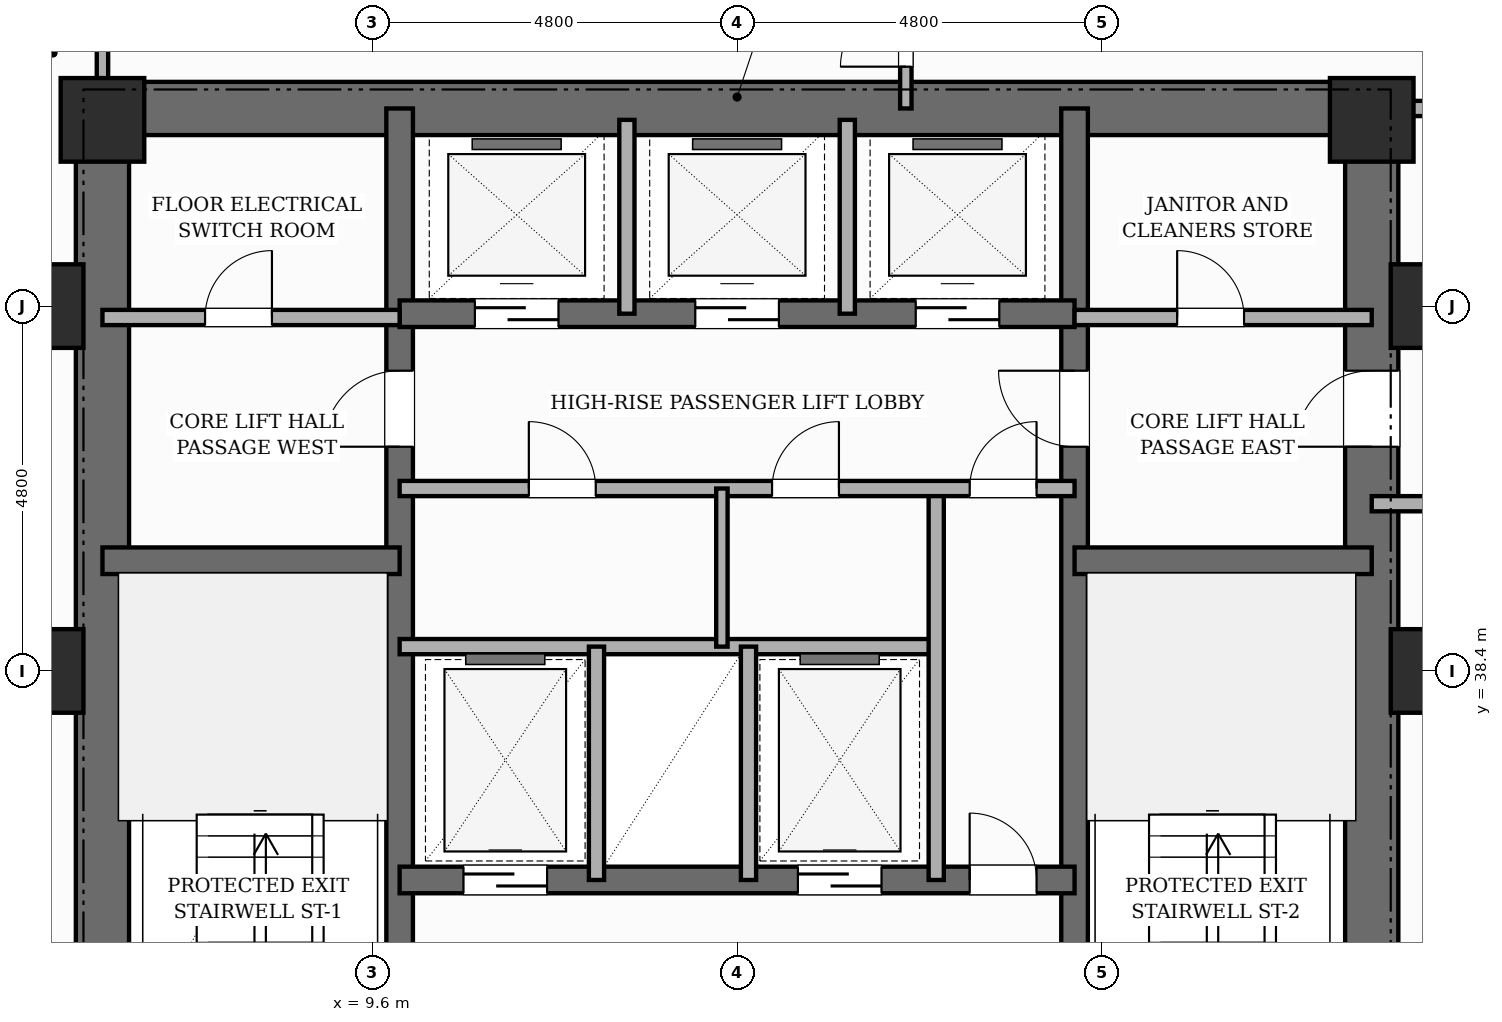
"""IFC4 building model, lengths in metres.
Left out: names, types, materials, properties, quantities, classifications, styles, units other than length and angle.
Written with IfcOpenShell. Run it as: python <this file> out.ifc"""

import sys

from ifc_helpers import new_model, si_unit, direction, frame, frame_2d, origin, origin_2d, place, context, subcontext, project, spatial, rectangle, extrude, element, fill, save


model = new_model("IFC4")
c1 = context("Model", 3, precision=1e-05, world=origin(), true_north=direction((0.0, 1.0)))
c2 = subcontext(c1, "Body", "Model", "MODEL_VIEW")
j1 = project(units=[si_unit("LENGTHUNIT", "METRE"), si_unit("PLANEANGLEUNIT", "RADIAN")], contexts=[c1])
p1 = place(None, origin())
s1 = spatial("IfcSite", under=j1, at=p1, CompositionType="ELEMENT")
p2 = place(p1, origin())
s2 = spatial("IfcBuilding", under=s1, at=p2, CompositionType="ELEMENT")
p3 = place(p2, frame((0.0, 0.0, 97.0)))
s3 = spatial("IfcBuildingStorey", under=s2, at=p3, CompositionType="ELEMENT", Elevation=97.0)
p4 = place(p3, frame((6.05, 30.55, 0.0), z_axis=(0.0, 0.0, 1.0), x_axis=(0.0, 1.0, 0.0)))
e1 = element("IfcWall", 1, at=p4, inside=s3, PredefinedType="SHEAR", context=c2, shape_type="SweptSolid", body=[
    extrude(rectangle(XDim=15.6, YDim=0.7, at=frame_2d((7.8, 0.0))), origin(), (0.0, 0.0, 1.0), 4.8),
])
p5 = place(p3, frame((22.75, 30.55, 0.0), z_axis=(0.0, 0.0, 1.0), x_axis=(0.0, 1.0, 0.0)))
e2 = element("IfcWall", 2, at=p5, inside=s3, PredefinedType="SHEAR", context=c2, shape_type="SweptSolid", body=[
    extrude(rectangle(XDim=15.6, YDim=0.7, at=frame_2d((7.8, 0.0))), origin(), (0.0, 0.0, 1.0), 4.8),
])
p6 = place(p5, frame((10.8, 0.0, 0.0)))
e3 = element("IfcOpeningElement", 3, at=p6, cuts=e2, PredefinedType="OPENING", context=c2, shape_type="SweptSolid", body=[
    extrude(rectangle(XDim=1.0, YDim=2.15, at=frame_2d((0.5, 1.075))), frame((0.0, 0.36, 0.0), z_axis=(0.0, -1.0, 0.0), x_axis=(1.0, 0.0, 0.0)), (0.0, 0.0, 1.0), 0.72),
])
p7 = place(p3, frame((6.05, 45.8, 0.0), z_axis=(0.0, 0.0, 1.0), x_axis=(1.0, 0.0, 0.0)))
e4 = element("IfcWall", 4, at=p7, inside=s3, PredefinedType="SHEAR", context=c2, shape_type="SweptSolid", body=[
    extrude(rectangle(XDim=16.7, YDim=0.7, at=frame_2d((8.35, 0.0))), origin(), (0.0, 0.0, 1.0), 4.8),
])
p8 = place(p3, frame((9.96, 30.9, 0.0), z_axis=(0.0, 0.0, 1.0), x_axis=(0.0, 1.0, 0.0)))
e5 = element("IfcWall", 5, at=p8, inside=s3, PredefinedType="SHEAR", context=c2, shape_type="SweptSolid", body=[
    extrude(rectangle(XDim=14.9, YDim=0.35, at=frame_2d((7.45, 0.0))), origin(), (0.0, 0.0, 1.0), 4.8),
])
p9 = place(p8, frame((0.65, 0.0, 0.0)))
e6 = element("IfcOpeningElement", 6, at=p9, cuts=e5, PredefinedType="OPENING", context=c2, shape_type="SweptSolid", body=[
    extrude(rectangle(XDim=0.95, YDim=2.1, at=frame_2d((0.475, 1.05))), frame((0.0, 0.185, 0.0), z_axis=(0.0, -1.0, 0.0), x_axis=(1.0, 0.0, 0.0)), (0.0, 0.0, 1.0), 0.37),
])
p10 = place(p8, frame((10.45, 0.0, 0.0)))
e7 = element("IfcOpeningElement", 7, at=p10, cuts=e5, PredefinedType="OPENING", context=c2, shape_type="SweptSolid", body=[
    extrude(rectangle(XDim=1.0, YDim=2.15, at=frame_2d((0.5, 1.075))), frame((0.0, 0.185, 0.0), z_axis=(0.0, -1.0, 0.0), x_axis=(1.0, 0.0, 0.0)), (0.0, 0.0, 1.0), 0.37),
])
p11 = place(p3, frame((18.84, 30.9, 0.0), z_axis=(0.0, 0.0, 1.0), x_axis=(0.0, 1.0, 0.0)))
e8 = element("IfcWall", 8, at=p11, inside=s3, PredefinedType="SHEAR", context=c2, shape_type="SweptSolid", body=[
    extrude(rectangle(XDim=14.9, YDim=0.35, at=frame_2d((7.45, 0.0))), origin(), (0.0, 0.0, 1.0), 4.8),
])
p12 = place(p11, frame((0.65, 0.0, 0.0)))
e9 = element("IfcOpeningElement", 9, at=p12, cuts=e8, PredefinedType="OPENING", context=c2, shape_type="SweptSolid", body=[
    extrude(rectangle(XDim=0.95, YDim=2.1, at=frame_2d((0.475, 1.05))), frame((0.0, 0.185, 0.0), z_axis=(0.0, -1.0, 0.0), x_axis=(1.0, 0.0, 0.0)), (0.0, 0.0, 1.0), 0.37),
])
p13 = place(p11, frame((10.45, 0.0, 0.0)))
e10 = element("IfcOpeningElement", 10, at=p13, cuts=e8, PredefinedType="OPENING", context=c2, shape_type="SweptSolid", body=[
    extrude(rectangle(XDim=1.0, YDim=2.15, at=frame_2d((0.5, 1.075))), frame((0.0, 0.185, 0.0), z_axis=(0.0, -1.0, 0.0), x_axis=(1.0, 0.0, 0.0)), (0.0, 0.0, 1.0), 0.37),
])
for number, where, z_axis, x_axis in (
    (11, (6.05, 39.85, 0.0), (0.0, 0.0, 1.0), (1.0, 0.0, 0.0)),
    (12, (18.84, 39.85, 0.0), (0.0, 0.0, 1.0), (1.0, 0.0, 0.0)),
):
    element("IfcWall", number, at=place(p3, frame(where, z_axis=z_axis, x_axis=x_axis)), inside=s3, PredefinedType="SHEAR", context=c2, shape_type="SweptSolid", body=[
        extrude(rectangle(XDim=3.91, YDim=0.35, at=frame_2d((1.955, 0.0))), origin(), (0.0, 0.0, 1.0), 4.8),
    ])
p14 = place(p3, frame((9.96, 35.65, 0.0), z_axis=(0.0, 0.0, 1.0), x_axis=(1.0, 0.0, 0.0)))
e13 = element("IfcWall", 13, at=p14, inside=s3, PredefinedType="SHEAR", context=c2, shape_type="SweptSolid", body=[
    extrude(rectangle(XDim=8.88, YDim=0.35, at=frame_2d((4.44, 0.0))), origin(), (0.0, 0.0, 1.0), 4.8),
])
p15 = place(p14, frame((0.84, 0.0, 0.0)))
e14 = element("IfcOpeningElement", 14, at=p15, cuts=e13, PredefinedType="OPENING", context=c2, shape_type="SweptSolid", body=[
    extrude(rectangle(XDim=1.1, YDim=2.15, at=frame_2d((0.55, 1.075))), frame((0.0, 0.185, 0.0), z_axis=(0.0, -1.0, 0.0), x_axis=(1.0, 0.0, 0.0)), (0.0, 0.0, 1.0), 0.37),
])
p16 = place(p14, frame((5.24, 0.0, 0.0)))
e15 = element("IfcOpeningElement", 15, at=p16, cuts=e13, PredefinedType="OPENING", context=c2, shape_type="SweptSolid", body=[
    extrude(rectangle(XDim=1.1, YDim=2.15, at=frame_2d((0.55, 1.075))), frame((0.0, 0.185, 0.0), z_axis=(0.0, -1.0, 0.0), x_axis=(1.0, 0.0, 0.0)), (0.0, 0.0, 1.0), 0.37),
])
p17 = place(p14, frame((7.5, 0.0, 0.0)))
e16 = element("IfcOpeningElement", 16, at=p17, cuts=e13, PredefinedType="OPENING", context=c2, shape_type="SweptSolid", body=[
    extrude(rectangle(XDim=0.88, YDim=2.1, at=frame_2d((0.44, 1.05))), frame((0.0, 0.185, 0.0), z_axis=(0.0, -1.0, 0.0), x_axis=(1.0, 0.0, 0.0)), (0.0, 0.0, 1.0), 0.37),
])
p18 = place(p3, frame((9.96, 43.1, 0.0), z_axis=(0.0, 0.0, 1.0), x_axis=(1.0, 0.0, 0.0)))
e17 = element("IfcWall", 17, at=p18, inside=s3, PredefinedType="SHEAR", context=c2, shape_type="SweptSolid", body=[
    extrude(rectangle(XDim=8.88, YDim=0.35, at=frame_2d((4.44, 0.0))), origin(), (0.0, 0.0, 1.0), 4.8),
])
p19 = place(p18, frame((0.99, 0.0, 0.0)))
e18 = element("IfcOpeningElement", 18, at=p19, cuts=e17, PredefinedType="OPENING", context=c2, shape_type="SweptSolid", body=[
    extrude(rectangle(XDim=1.1, YDim=2.15, at=frame_2d((0.55, 1.075))), frame((0.0, 0.185, 0.0), z_axis=(0.0, -1.0, 0.0), x_axis=(1.0, 0.0, 0.0)), (0.0, 0.0, 1.0), 0.37),
])
p20 = place(p18, frame((3.89, 0.0, 0.0)))
e19 = element("IfcOpeningElement", 19, at=p20, cuts=e17, PredefinedType="OPENING", context=c2, shape_type="SweptSolid", body=[
    extrude(rectangle(XDim=1.1, YDim=2.15, at=frame_2d((0.55, 1.075))), frame((0.0, 0.185, 0.0), z_axis=(0.0, -1.0, 0.0), x_axis=(1.0, 0.0, 0.0)), (0.0, 0.0, 1.0), 0.37),
])
p21 = place(p18, frame((6.79, 0.0, 0.0)))
e20 = element("IfcOpeningElement", 20, at=p21, cuts=e17, PredefinedType="OPENING", context=c2, shape_type="SweptSolid", body=[
    extrude(rectangle(XDim=1.1, YDim=2.15, at=frame_2d((0.55, 1.075))), frame((0.0, 0.185, 0.0), z_axis=(0.0, -1.0, 0.0), x_axis=(1.0, 0.0, 0.0)), (0.0, 0.0, 1.0), 0.37),
])
for number, where, z_axis, x_axis in (
    (21, (5.25, 38.4, 0.0), (0.0, 0.0, 1.0), (1.0, 0.0, 0.0)),
    (22, (5.25, 43.2, 0.0), (0.0, 0.0, 1.0), (1.0, 0.0, 0.0)),
    (23, (6.05, 45.65, 0.0), (0.0, 0.0, 1.0), (1.0, 0.0, 0.0)),
    (24, (22.75, 45.65, 0.0), (0.0, 0.0, 1.0), (1.0, 0.0, 0.0)),
    (25, (23.55, 38.4, 0.0), (0.0, 0.0, 1.0), (1.0, 0.0, 0.0)),
    (26, (23.55, 43.2, 0.0), (0.0, 0.0, 1.0), (1.0, 0.0, 0.0)),
):
    element("IfcColumn", number, at=place(p3, frame(where, z_axis=z_axis, x_axis=x_axis)), inside=s3, PredefinedType="COLUMN", context=c2, shape_type="SweptSolid", body=[
        extrude(rectangle(XDim=1.1, YDim=1.1, at=origin_2d()), origin(), (0.0, 0.0, 1.0), 4.8),
    ])
p22 = place(p3, frame((5.03, 46.16, 0.0), z_axis=(0.0, 0.0, 1.0), x_axis=(0.382650053678, 0.92389335771, 0.0)))
e27 = element("IfcWall", 27, at=p22, inside=s3, PredefinedType="STANDARD", context=c2, shape_type="SweptSolid", body=[
    extrude(rectangle(XDim=0.626, YDim=0.32, at=frame_2d((0.313, 0.0))), origin(), (0.0, 0.0, 1.0), 4.5),
])
p23 = place(p3, frame((9.96, 38.72, 0.0), z_axis=(0.0, 0.0, 1.0), x_axis=(1.0, 0.0, 0.0)))
e28 = element("IfcWall", 28, at=p23, inside=s3, PredefinedType="POLYGONAL", context=c2, shape_type="SweptSolid", body=[
    extrude(rectangle(XDim=7.06, YDim=0.2, at=frame_2d((3.53, 0.0))), origin(), (0.0, 0.0, 1.0), 4.5),
])
for number, where, z_axis, x_axis in (
    (29, (12.55, 35.65, 0.0), (0.0, 0.0, 1.0), (0.0, 1.0, 0.0)),
    (30, (14.55, 35.65, 0.0), (0.0, 0.0, 1.0), (0.0, 1.0, 0.0)),
):
    element("IfcWall", number, at=place(p3, frame(where, z_axis=z_axis, x_axis=x_axis)), inside=s3, PredefinedType="POLYGONAL", context=c2, shape_type="SweptSolid", body=[
        extrude(rectangle(XDim=3.07, YDim=0.2, at=frame_2d((1.535, 0.0))), origin(), (0.0, 0.0, 1.0), 4.5),
    ])
p24 = place(p3, frame((17.02, 35.65, 0.0), z_axis=(0.0, 0.0, 1.0), x_axis=(0.0, 1.0, 0.0)))
e31 = element("IfcWall", 31, at=p24, inside=s3, PredefinedType="POLYGONAL", context=c2, shape_type="SweptSolid", body=[
    extrude(rectangle(XDim=5.15, YDim=0.2, at=frame_2d((2.575, 0.0))), origin(), (0.0, 0.0, 1.0), 4.5),
])
p25 = place(p3, frame((9.96, 40.8, 0.0), z_axis=(0.0, 0.0, 1.0), x_axis=(1.0, 0.0, 0.0)))
e32 = element("IfcWall", 32, at=p25, inside=s3, PredefinedType="POLYGONAL", context=c2, shape_type="SweptSolid", body=[
    extrude(rectangle(XDim=8.88, YDim=0.2, at=frame_2d((4.44, 0.0))), origin(), (0.0, 0.0, 1.0), 4.5),
])
p26 = place(p25, frame((7.5, 0.0, 0.0)))
e33 = element("IfcOpeningElement", 33, at=p26, cuts=e32, PredefinedType="OPENING", context=c2, shape_type="SweptSolid", body=[
    extrude(rectangle(XDim=0.88, YDim=2.1, at=frame_2d((0.44, 1.05))), frame((0.0, 0.11, 0.0), z_axis=(0.0, -1.0, 0.0), x_axis=(1.0, 0.0, 0.0)), (0.0, 0.0, 1.0), 0.22),
])
p27 = place(p25, frame((1.7, 0.0, 0.0)))
e34 = element("IfcOpeningElement", 34, at=p27, cuts=e32, PredefinedType="OPENING", context=c2, shape_type="SweptSolid", body=[
    extrude(rectangle(XDim=0.88, YDim=2.1, at=frame_2d((0.44, 1.05))), frame((0.0, 0.11, 0.0), z_axis=(0.0, -1.0, 0.0), x_axis=(1.0, 0.0, 0.0)), (0.0, 0.0, 1.0), 0.22),
])
p28 = place(p25, frame((4.9, 0.0, 0.0)))
e35 = element("IfcOpeningElement", 35, at=p28, cuts=e32, PredefinedType="OPENING", context=c2, shape_type="SweptSolid", body=[
    extrude(rectangle(XDim=0.88, YDim=2.1, at=frame_2d((0.44, 1.05))), frame((0.0, 0.11, 0.0), z_axis=(0.0, -1.0, 0.0), x_axis=(1.0, 0.0, 0.0)), (0.0, 0.0, 1.0), 0.22),
])
p29 = place(p3, frame((18.84, 43.05, 0.0), z_axis=(0.0, 0.0, 1.0), x_axis=(1.0, 0.0, 0.0)))
e36 = element("IfcWall", 36, at=p29, inside=s3, PredefinedType="POLYGONAL", context=c2, shape_type="SweptSolid", body=[
    extrude(rectangle(XDim=3.91, YDim=0.2, at=frame_2d((1.955, 0.0))), origin(), (0.0, 0.0, 1.0), 3.68),
])
p30 = place(p29, frame((1.35, 0.0, 0.0)))
e37 = element("IfcOpeningElement", 37, at=p30, cuts=e36, PredefinedType="OPENING", context=c2, shape_type="SweptSolid", body=[
    extrude(rectangle(XDim=0.88, YDim=2.1, at=frame_2d((0.44, 1.05))), frame((0.0, 0.11, 0.0), z_axis=(0.0, -1.0, 0.0), x_axis=(1.0, 0.0, 0.0)), (0.0, 0.0, 1.0), 0.22),
])
p31 = place(p3, frame((6.05, 43.05, 0.0), z_axis=(0.0, 0.0, 1.0), x_axis=(1.0, 0.0, 0.0)))
e38 = element("IfcWall", 38, at=p31, inside=s3, PredefinedType="POLYGONAL", context=c2, shape_type="SweptSolid", body=[
    extrude(rectangle(XDim=3.91, YDim=0.2, at=frame_2d((1.955, 0.0))), origin(), (0.0, 0.0, 1.0), 3.68),
])
p32 = place(p31, frame((1.35, 0.0, 0.0)))
e39 = element("IfcOpeningElement", 39, at=p32, cuts=e38, PredefinedType="OPENING", context=c2, shape_type="SweptSolid", body=[
    extrude(rectangle(XDim=0.88, YDim=2.1, at=frame_2d((0.44, 1.05))), frame((0.0, 0.11, 0.0), z_axis=(0.0, -1.0, 0.0), x_axis=(1.0, 0.0, 0.0)), (0.0, 0.0, 1.0), 0.22),
])
for number, where, z_axis, x_axis in (
    (40, (12.95, 43.1, 0.0), (0.0, 0.0, 1.0), (0.0, 1.0, 0.0)),
    (41, (15.85, 43.1, 0.0), (0.0, 0.0, 1.0), (0.0, 1.0, 0.0)),
):
    element("IfcWall", number, at=place(p3, frame(where, z_axis=z_axis, x_axis=x_axis)), inside=s3, PredefinedType="POLYGONAL", context=c2, shape_type="SweptSolid", body=[
        extrude(rectangle(XDim=2.55, YDim=0.2, at=frame_2d((1.275, 0.0))), origin(), (0.0, 0.0, 1.0), 4.5),
    ])
p33 = place(p3, frame((14.2, 38.72, 0.0), z_axis=(0.0, 0.0, 1.0), x_axis=(0.0, 1.0, 0.0)))
e42 = element("IfcWall", 42, at=p33, inside=s3, PredefinedType="PARTITIONING", context=c2, shape_type="SweptSolid", body=[
    extrude(rectangle(XDim=2.08, YDim=0.15, at=frame_2d((1.04, 0.0))), origin(), (0.0, 0.0, 1.0), 4.5),
])
p34 = place(p3, frame((6.05, 45.8, 0.0), z_axis=(0.0, 0.0, 1.0), x_axis=(0.0, 1.0, 0.0)))
e43 = element("IfcWall", 43, at=p34, inside=s3, PredefinedType="PARTITIONING", context=c2, shape_type="SweptSolid", body=[
    extrude(rectangle(XDim=1.46, YDim=0.15, at=frame_2d((0.73, 0.0))), origin(), (0.0, 0.0, 1.0), 4.5),
])
p35 = place(p3, frame((16.62, 45.8, 0.0), z_axis=(0.0, 0.0, 1.0), x_axis=(0.0, 1.0, 0.0)))
e44 = element("IfcWall", 44, at=p35, inside=s3, PredefinedType="PARTITIONING", context=c2, shape_type="SweptSolid", body=[
    extrude(rectangle(XDim=1.88, YDim=0.15, at=frame_2d((0.94, 0.0))), origin(), (0.0, 0.0, 1.0), 4.5),
])
p36 = place(p35, frame((0.55, 0.0, 0.0)))
e45 = element("IfcOpeningElement", 45, at=p36, cuts=e44, PredefinedType="OPENING", context=c2, shape_type="SweptSolid", body=[
    extrude(rectangle(XDim=0.86, YDim=2.1, at=frame_2d((0.43, 1.05))), frame((0.0, 0.085, 0.0), z_axis=(0.0, -1.0, 0.0), x_axis=(1.0, 0.0, 0.0)), (0.0, 0.0, 1.0), 0.17),
])
p37 = place(p3, frame((22.75, 45.8, 0.0), z_axis=(0.0, 0.0, 1.0), x_axis=(1.0, 0.0, 0.0)))
e46 = element("IfcWall", 46, at=p37, inside=s3, PredefinedType="PARTITIONING", context=c2, shape_type="SweptSolid", body=[
    extrude(rectangle(XDim=2.75, YDim=0.2, at=frame_2d((1.375, 0.0))), origin(), (0.0, 0.0, 1.0), 4.5),
])
p38 = place(p3, frame((22.75, 40.6, 0.0), z_axis=(0.0, 0.0, 1.0), x_axis=(1.0, 0.0, 0.0)))
e47 = element("IfcWall", 47, at=p38, inside=s3, PredefinedType="PARTITIONING", context=c2, shape_type="SweptSolid", body=[
    extrude(rectangle(XDim=3.33, YDim=0.2, at=frame_2d((1.665, 0.0))), origin(), (0.0, 0.0, 1.0), 4.5),
])
p39 = place(p38, frame((0.88, 0.0, 0.0)))
e48 = element("IfcOpeningElement", 48, at=p39, cuts=e47, PredefinedType="OPENING", context=c2, shape_type="SweptSolid", body=[
    extrude(rectangle(XDim=0.86, YDim=2.1, at=frame_2d((0.43, 1.05))), frame((0.0, 0.11, 0.0), z_axis=(0.0, -1.0, 0.0), x_axis=(1.0, 0.0, 0.0)), (0.0, 0.0, 1.0), 0.22),
])
p40 = place(p15, origin())
e49 = element("IfcDoor", 49, at=p40, inside=s3, OperationType="SLIDING_TO_LEFT", PredefinedType="DOOR", context=c2, shape_type="SweptSolid", body=[
    extrude(rectangle(XDim=1.1, YDim=2.15, at=frame_2d((0.55, 1.075))), frame((0.0, 0.025, 0.0), z_axis=(0.0, -1.0, 0.0), x_axis=(1.0, 0.0, 0.0)), (0.0, 0.0, 1.0), 0.05),
])
fill(e14, e49)
p41 = place(p16, origin())
e50 = element("IfcDoor", 50, at=p41, inside=s3, OperationType="SLIDING_TO_RIGHT", PredefinedType="DOOR", context=c2, shape_type="SweptSolid", body=[
    extrude(rectangle(XDim=1.1, YDim=2.15, at=frame_2d((0.55, 1.075))), frame((0.0, 0.025, 0.0), z_axis=(0.0, -1.0, 0.0), x_axis=(1.0, 0.0, 0.0)), (0.0, 0.0, 1.0), 0.05),
])
fill(e15, e50)
p42 = place(p17, origin())
e51 = element("IfcDoor", 51, at=p42, inside=s3, OperationType="SINGLE_SWING_LEFT", PredefinedType="DOOR", context=c2, shape_type="SweptSolid", body=[
    extrude(rectangle(XDim=0.88, YDim=2.1, at=frame_2d((0.44, 1.05))), frame((0.0, 0.025, 0.0), z_axis=(0.0, -1.0, 0.0), x_axis=(1.0, 0.0, 0.0)), (0.0, 0.0, 1.0), 0.05),
])
fill(e16, e51)
p43 = place(p26, origin())
e52 = element("IfcDoor", 52, at=p43, inside=s3, OperationType="SINGLE_SWING_RIGHT", PredefinedType="DOOR", context=c2, shape_type="SweptSolid", body=[
    extrude(rectangle(XDim=0.88, YDim=2.1, at=frame_2d((0.44, 1.05))), frame((0.0, 0.025, 0.0), z_axis=(0.0, -1.0, 0.0), x_axis=(1.0, 0.0, 0.0)), (0.0, 0.0, 1.0), 0.05),
])
fill(e33, e52)
p44 = place(p19, origin())
e53 = element("IfcDoor", 53, at=p44, inside=s3, OperationType="SLIDING_TO_LEFT", PredefinedType="DOOR", context=c2, shape_type="SweptSolid", body=[
    extrude(rectangle(XDim=1.1, YDim=2.15, at=frame_2d((0.55, 1.075))), frame((0.0, 0.025, 0.0), z_axis=(0.0, -1.0, 0.0), x_axis=(1.0, 0.0, 0.0)), (0.0, 0.0, 1.0), 0.05),
])
fill(e18, e53)
p45 = place(p20, origin())
e54 = element("IfcDoor", 54, at=p45, inside=s3, OperationType="SLIDING_TO_RIGHT", PredefinedType="DOOR", context=c2, shape_type="SweptSolid", body=[
    extrude(rectangle(XDim=1.1, YDim=2.15, at=frame_2d((0.55, 1.075))), frame((0.0, 0.025, 0.0), z_axis=(0.0, -1.0, 0.0), x_axis=(1.0, 0.0, 0.0)), (0.0, 0.0, 1.0), 0.05),
])
fill(e19, e54)
p46 = place(p21, origin())
e55 = element("IfcDoor", 55, at=p46, inside=s3, OperationType="SLIDING_TO_LEFT", PredefinedType="DOOR", context=c2, shape_type="SweptSolid", body=[
    extrude(rectangle(XDim=1.1, YDim=2.15, at=frame_2d((0.55, 1.075))), frame((0.0, 0.025, 0.0), z_axis=(0.0, -1.0, 0.0), x_axis=(1.0, 0.0, 0.0)), (0.0, 0.0, 1.0), 0.05),
])
fill(e20, e55)
p47 = place(p10, origin())
e56 = element("IfcDoor", 56, at=p47, inside=s3, OperationType="SINGLE_SWING_LEFT", PredefinedType="DOOR", context=c2, shape_type="SweptSolid", body=[
    extrude(rectangle(XDim=1.0, YDim=2.15, at=frame_2d((0.5, 1.075))), frame((0.0, 0.025, 0.0), z_axis=(0.0, -1.0, 0.0), x_axis=(1.0, 0.0, 0.0)), (0.0, 0.0, 1.0), 0.05),
])
fill(e7, e56)
p48 = place(p13, origin())
e57 = element("IfcDoor", 57, at=p48, inside=s3, OperationType="SINGLE_SWING_RIGHT", PredefinedType="DOOR", context=c2, shape_type="SweptSolid", body=[
    extrude(rectangle(XDim=1.0, YDim=2.15, at=frame_2d((0.5, 1.075))), frame((0.0, 0.025, 0.0), z_axis=(0.0, -1.0, 0.0), x_axis=(1.0, 0.0, 0.0)), (0.0, 0.0, 1.0), 0.05),
])
fill(e10, e57)
p49 = place(p6, origin())
e58 = element("IfcDoor", 58, at=p49, inside=s3, OperationType="SINGLE_SWING_LEFT", PredefinedType="DOOR", context=c2, shape_type="SweptSolid", body=[
    extrude(rectangle(XDim=1.0, YDim=2.15, at=frame_2d((0.5, 1.075))), frame((0.0, 0.025, 0.0), z_axis=(0.0, -1.0, 0.0), x_axis=(1.0, 0.0, 0.0)), (0.0, 0.0, 1.0), 0.05),
])
fill(e3, e58)
p50 = place(p32, origin())
e59 = element("IfcDoor", 59, at=p50, inside=s3, OperationType="SINGLE_SWING_RIGHT", PredefinedType="DOOR", context=c2, shape_type="SweptSolid", body=[
    extrude(rectangle(XDim=0.88, YDim=2.1, at=frame_2d((0.44, 1.05))), frame((0.0, 0.025, 0.0), z_axis=(0.0, -1.0, 0.0), x_axis=(1.0, 0.0, 0.0)), (0.0, 0.0, 1.0), 0.05),
])
fill(e39, e59)
p51 = place(p27, origin())
e60 = element("IfcDoor", 60, at=p51, inside=s3, OperationType="SINGLE_SWING_LEFT", PredefinedType="DOOR", context=c2, shape_type="SweptSolid", body=[
    extrude(rectangle(XDim=0.88, YDim=2.1, at=frame_2d((0.44, 1.05))), frame((0.0, 0.025, 0.0), z_axis=(0.0, -1.0, 0.0), x_axis=(1.0, 0.0, 0.0)), (0.0, 0.0, 1.0), 0.05),
])
fill(e34, e60)
p52 = place(p28, origin())
e61 = element("IfcDoor", 61, at=p52, inside=s3, OperationType="SINGLE_SWING_RIGHT", PredefinedType="DOOR", context=c2, shape_type="SweptSolid", body=[
    extrude(rectangle(XDim=0.88, YDim=2.1, at=frame_2d((0.44, 1.05))), frame((0.0, 0.025, 0.0), z_axis=(0.0, -1.0, 0.0), x_axis=(1.0, 0.0, 0.0)), (0.0, 0.0, 1.0), 0.05),
])
fill(e35, e61)
p53 = place(p30, origin())
e62 = element("IfcDoor", 62, at=p53, inside=s3, OperationType="SINGLE_SWING_LEFT", PredefinedType="DOOR", context=c2, shape_type="SweptSolid", body=[
    extrude(rectangle(XDim=0.88, YDim=2.1, at=frame_2d((0.44, 1.05))), frame((0.0, 0.025, 0.0), z_axis=(0.0, -1.0, 0.0), x_axis=(1.0, 0.0, 0.0)), (0.0, 0.0, 1.0), 0.05),
])
fill(e37, e62)
p54 = place(p36, origin())
e63 = element("IfcDoor", 63, at=p54, inside=s3, OperationType="SINGLE_SWING_LEFT", PredefinedType="DOOR", context=c2, shape_type="SweptSolid", body=[
    extrude(rectangle(XDim=0.86, YDim=2.1, at=frame_2d((0.43, 1.05))), frame((0.0, 0.025, 0.0), z_axis=(0.0, -1.0, 0.0), x_axis=(1.0, 0.0, 0.0)), (0.0, 0.0, 1.0), 0.05),
])
fill(e45, e63)
save(model, sys.argv[1])
